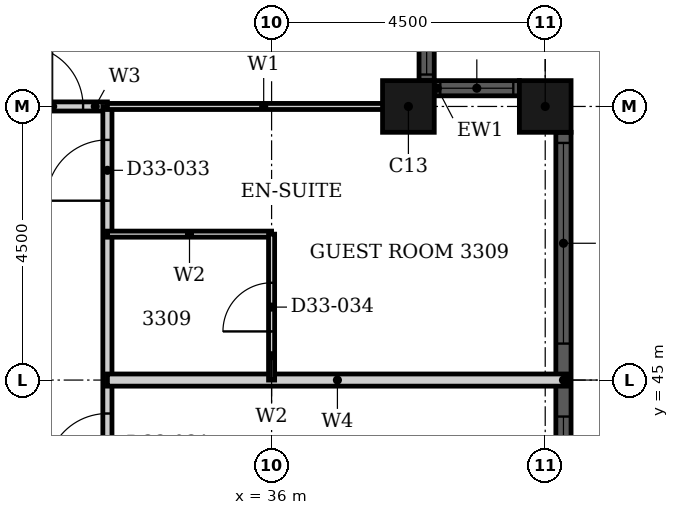
"""IFC4 building model, lengths in metres.
Left out: names, types, materials, properties, quantities, classifications, styles, units other than length and angle.
Written with IfcOpenShell. Run it as: python <this file> out.ifc"""

import sys

from ifc_helpers import new_model, si_unit, direction, frame, frame_2d, origin, origin_2d, place, context, subcontext, project, spatial, rectangle, hollow_rectangle, extrude, element, fill, save


model = new_model("IFC4")
c1 = context("Model", 3, precision=1e-05, world=origin(), true_north=direction((0.0, 1.0)))
c2 = subcontext(c1, "Body", "Model", "MODEL_VIEW")
j1 = project(units=[si_unit("LENGTHUNIT", "METRE"), si_unit("PLANEANGLEUNIT", "RADIAN")], contexts=[c1])
p1 = place(None, origin())
s1 = spatial("IfcSite", under=j1, at=p1, CompositionType="ELEMENT")
p2 = place(p1, origin())
s2 = spatial("IfcBuilding", under=s1, at=p2, CompositionType="ELEMENT")
p3 = place(p2, frame((0.0, 0.0, 133.2)))
s3 = spatial("IfcBuildingStorey", under=s2, at=p3, CompositionType="ELEMENT", Elevation=133.2)
for number, where, z_axis, x_axis in (
    (1, (40.5, 49.5, 0.0), (0.0, 0.0, 1.0), (1.0, 0.0, 0.0)),
    (2, (38.25, 49.5, 0.0), (0.0, 0.0, 1.0), (1.0, 0.0, 0.0)),
):
    element("IfcColumn", number, at=place(p3, frame(where, z_axis=z_axis, x_axis=x_axis)), inside=s3, PredefinedType="COLUMN", context=c2, shape_type="SweptSolid", body=[
        extrude(hollow_rectangle(XDim=0.85, YDim=0.85, WallThickness=0.026, at=origin_2d()), origin(), (0.0, 0.0, 1.0), 3.6),
    ])
p4 = place(p3, frame((40.8, 40.925, 0.0), z_axis=(0.0, 0.0, 1.0), x_axis=(0.0, 1.0, 0.0)))
e3 = element("IfcWall", 3, at=p4, inside=s3, PredefinedType="SOLIDWALL", context=c2, shape_type="SweptSolid", body=[
    extrude(rectangle(XDim=8.15, YDim=0.25, at=frame_2d((4.075, 0.0))), origin(), (0.0, 0.0, 1.0), 3.6),
])
p5 = place(p4, frame((0.175, 0.0, 0.9)))
e4 = element("IfcOpeningElement", 4, at=p5, cuts=e3, PredefinedType="OPENING", context=c2, shape_type="SweptSolid", body=[
    extrude(rectangle(XDim=3.3, YDim=2.08, at=frame_2d((1.65, 1.04))), frame((0.0, 0.135, 0.0), z_axis=(0.0, -1.0, 0.0), x_axis=(1.0, 0.0, 0.0)), (0.0, 0.0, 1.0), 0.27),
])
p6 = place(p4, frame((4.675, 0.0, 0.9)))
e5 = element("IfcOpeningElement", 5, at=p6, cuts=e3, PredefinedType="OPENING", context=c2, shape_type="SweptSolid", body=[
    extrude(rectangle(XDim=3.3, YDim=2.08, at=frame_2d((1.65, 1.04))), frame((0.0, 0.135, 0.0), z_axis=(0.0, -1.0, 0.0), x_axis=(1.0, 0.0, 0.0)), (0.0, 0.0, 1.0), 0.27),
])
p7 = place(p3, frame((40.075, 49.8, 0.0), z_axis=(0.0, 0.0, 1.0), x_axis=(-1.0, 0.0, 0.0)))
e6 = element("IfcWall", 6, at=p7, inside=s3, PredefinedType="SOLIDWALL", context=c2, shape_type="SweptSolid", body=[
    extrude(rectangle(XDim=1.4, YDim=0.25, at=frame_2d((0.7, 0.0))), origin(), (0.0, 0.0, 1.0), 3.6),
])
p8 = place(p7, frame((0.1, 0.0, 0.9)))
e7 = element("IfcOpeningElement", 7, at=p8, cuts=e6, PredefinedType="OPENING", context=c2, shape_type="SweptSolid", body=[
    extrude(rectangle(XDim=1.2, YDim=2.08, at=frame_2d((0.6, 1.04))), frame((0.0, 0.135, 0.0), z_axis=(0.0, -1.0, 0.0), x_axis=(1.0, 0.0, 0.0)), (0.0, 0.0, 1.0), 0.27),
])
p9 = place(p3, frame((38.55, 49.925, 0.0), z_axis=(0.0, 0.0, 1.0), x_axis=(0.0, 1.0, 0.0)))
e8 = element("IfcWall", 8, at=p9, inside=s3, PredefinedType="SOLIDWALL", context=c2, shape_type="SweptSolid", body=[
    extrude(rectangle(XDim=1.4, YDim=0.25, at=frame_2d((0.7, 0.0))), origin(), (0.0, 0.0, 1.0), 3.6),
])
p10 = place(p9, frame((0.1, 0.0, 0.9)))
e9 = element("IfcOpeningElement", 9, at=p10, cuts=e8, PredefinedType="OPENING", context=c2, shape_type="SweptSolid", body=[
    extrude(rectangle(XDim=1.2, YDim=2.08, at=frame_2d((0.6, 1.04))), frame((0.0, 0.135, 0.0), z_axis=(0.0, -1.0, 0.0), x_axis=(1.0, 0.0, 0.0)), (0.0, 0.0, 1.0), 0.27),
])
p11 = place(p3, frame((31.5, 49.5, 0.0), z_axis=(0.0, 0.0, 1.0), x_axis=(1.0, 0.0, 0.0)))
e10 = element("IfcWall", 10, at=p11, inside=s3, PredefinedType="PARTITIONING", context=c2, shape_type="SweptSolid", body=[
    extrude(rectangle(XDim=1.8, YDim=0.15, at=frame_2d((0.9, 0.0))), origin(), (0.0, 0.0, 1.0), 3.3),
])
p12 = place(p11, frame((0.4, 0.0, 0.0)))
e11 = element("IfcOpeningElement", 11, at=p12, cuts=e10, PredefinedType="OPENING", context=c2, shape_type="SweptSolid", body=[
    extrude(rectangle(XDim=1.0, YDim=2.1, at=frame_2d((0.5, 1.05))), frame((0.0, 0.085, 0.0), z_axis=(0.0, -1.0, 0.0), x_axis=(1.0, 0.0, 0.0)), (0.0, 0.0, 1.0), 0.17),
])
p13 = place(p3, frame((33.3, 33.3, 0.0), z_axis=(0.0, 0.0, 1.0), x_axis=(0.0, 1.0, 0.0)))
e12 = element("IfcWall", 12, at=p13, inside=s3, PredefinedType="PARTITIONING", context=c2, shape_type="SweptSolid", body=[
    extrude(rectangle(XDim=16.2, YDim=0.15, at=frame_2d((8.1, 0.0))), origin(), (0.0, 0.0, 1.0), 3.3),
])
p14 = place(p13, frame((10.15, 0.0, 0.0)))
e13 = element("IfcOpeningElement", 13, at=p14, cuts=e12, PredefinedType="OPENING", context=c2, shape_type="SweptSolid", body=[
    extrude(rectangle(XDim=1.0, YDim=2.1, at=frame_2d((0.5, 1.05))), frame((0.0, 0.085, 0.0), z_axis=(0.0, -1.0, 0.0), x_axis=(1.0, 0.0, 0.0)), (0.0, 0.0, 1.0), 0.17),
])
p15 = place(p13, frame((14.65, 0.0, 0.0)))
e14 = element("IfcOpeningElement", 14, at=p15, cuts=e12, PredefinedType="OPENING", context=c2, shape_type="SweptSolid", body=[
    extrude(rectangle(XDim=1.0, YDim=2.1, at=frame_2d((0.5, 1.05))), frame((0.0, 0.085, 0.0), z_axis=(0.0, -1.0, 0.0), x_axis=(1.0, 0.0, 0.0)), (0.0, 0.0, 1.0), 0.17),
])
p16 = place(p3, frame((33.3, 49.5, 0.0), z_axis=(0.0, 0.0, 1.0), x_axis=(1.0, 0.0, 0.0)))
e15 = element("IfcWall", 15, at=p16, inside=s3, PredefinedType="PARTITIONING", context=c2, shape_type="SweptSolid", body=[
    extrude(rectangle(XDim=5.14, YDim=0.1, at=frame_2d((2.57, 0.0))), origin(), (0.0, 0.0, 1.0), 3.3),
])
p17 = place(p3, frame((33.3, 45.0, 0.0), z_axis=(0.0, 0.0, 1.0), x_axis=(1.0, 0.0, 0.0)))
e16 = element("IfcWall", 16, at=p17, inside=s3, PredefinedType="PARTITIONING", context=c2, shape_type="SweptSolid", body=[
    extrude(rectangle(XDim=7.565, YDim=0.2, at=frame_2d((3.782, 0.0))), origin(), (0.0, 0.0, 1.0), 3.3),
])
p18 = place(p3, frame((33.3, 47.4, 0.0), z_axis=(0.0, 0.0, 1.0), x_axis=(1.0, 0.0, 0.0)))
e17 = element("IfcWall", 17, at=p18, inside=s3, PredefinedType="PARTITIONING", context=c2, shape_type="SweptSolid", body=[
    extrude(rectangle(XDim=2.7, YDim=0.1, at=frame_2d((1.35, 0.0))), origin(), (0.0, 0.0, 1.0), 3.3),
])
p19 = place(p3, frame((36.0, 45.0, 0.0), z_axis=(0.0, 0.0, 1.0), x_axis=(0.0, 1.0, 0.0)))
e18 = element("IfcWall", 18, at=p19, inside=s3, PredefinedType="PARTITIONING", context=c2, shape_type="SweptSolid", body=[
    extrude(rectangle(XDim=2.4, YDim=0.1, at=frame_2d((1.2, 0.0))), origin(), (0.0, 0.0, 1.0), 2.58),
])
p20 = place(p19, frame((0.8, 0.0, 0.0)))
e19 = element("IfcOpeningElement", 19, at=p20, cuts=e18, PredefinedType="OPENING", context=c2, shape_type="SweptSolid", body=[
    extrude(rectangle(XDim=0.8, YDim=2.1, at=frame_2d((0.4, 1.05))), frame((0.0, 0.06, 0.0), z_axis=(0.0, -1.0, 0.0), x_axis=(1.0, 0.0, 0.0)), (0.0, 0.0, 1.0), 0.12),
])
p21 = place(p5, origin())
e20 = element("IfcWindow", 20, at=p21, inside=s3, PartitioningType="SINGLE_PANEL", PredefinedType="WINDOW", context=c2, shape_type="SweptSolid", body=[
    extrude(rectangle(XDim=3.3, YDim=2.08, at=frame_2d((1.65, 1.04))), frame((0.0, 0.03, 0.0), z_axis=(0.0, -1.0, 0.0), x_axis=(1.0, 0.0, 0.0)), (0.0, 0.0, 1.0), 0.06),
])
fill(e4, e20)
p22 = place(p6, origin())
e21 = element("IfcWindow", 21, at=p22, inside=s3, PartitioningType="SINGLE_PANEL", PredefinedType="WINDOW", context=c2, shape_type="SweptSolid", body=[
    extrude(rectangle(XDim=3.3, YDim=2.08, at=frame_2d((1.65, 1.04))), frame((0.0, 0.03, 0.0), z_axis=(0.0, -1.0, 0.0), x_axis=(1.0, 0.0, 0.0)), (0.0, 0.0, 1.0), 0.06),
])
fill(e5, e21)
p23 = place(p8, origin())
e22 = element("IfcWindow", 22, at=p23, inside=s3, PartitioningType="SINGLE_PANEL", PredefinedType="WINDOW", context=c2, shape_type="SweptSolid", body=[
    extrude(rectangle(XDim=1.2, YDim=2.08, at=frame_2d((0.6, 1.04))), frame((0.0, 0.03, 0.0), z_axis=(0.0, -1.0, 0.0), x_axis=(1.0, 0.0, 0.0)), (0.0, 0.0, 1.0), 0.06),
])
fill(e7, e22)
p24 = place(p10, origin())
e23 = element("IfcWindow", 23, at=p24, inside=s3, PartitioningType="SINGLE_PANEL", PredefinedType="WINDOW", context=c2, shape_type="SweptSolid", body=[
    extrude(rectangle(XDim=1.2, YDim=2.08, at=frame_2d((0.6, 1.04))), frame((0.0, 0.03, 0.0), z_axis=(0.0, -1.0, 0.0), x_axis=(1.0, 0.0, 0.0)), (0.0, 0.0, 1.0), 0.06),
])
fill(e9, e23)
p25 = place(p14, origin())
e24 = element("IfcDoor", 24, at=p25, inside=s3, OperationType="SINGLE_SWING_RIGHT", PredefinedType="DOOR", context=c2, shape_type="SweptSolid", body=[
    extrude(rectangle(XDim=1.0, YDim=2.1, at=frame_2d((0.5, 1.05))), frame((0.0, 0.025, 0.0), z_axis=(0.0, -1.0, 0.0), x_axis=(1.0, 0.0, 0.0)), (0.0, 0.0, 1.0), 0.05),
])
fill(e13, e24)
p26 = place(p15, origin())
e25 = element("IfcDoor", 25, at=p26, inside=s3, OperationType="SINGLE_SWING_RIGHT", PredefinedType="DOOR", context=c2, shape_type="SweptSolid", body=[
    extrude(rectangle(XDim=1.0, YDim=2.1, at=frame_2d((0.5, 1.05))), frame((0.0, 0.025, 0.0), z_axis=(0.0, -1.0, 0.0), x_axis=(1.0, 0.0, 0.0)), (0.0, 0.0, 1.0), 0.05),
])
fill(e14, e25)
p27 = place(p20, origin())
e26 = element("IfcDoor", 26, at=p27, inside=s3, OperationType="SINGLE_SWING_RIGHT", PredefinedType="DOOR", context=c2, shape_type="SweptSolid", body=[
    extrude(rectangle(XDim=0.8, YDim=2.1, at=frame_2d((0.4, 1.05))), frame((0.0, 0.025, 0.0), z_axis=(0.0, -1.0, 0.0), x_axis=(1.0, 0.0, 0.0)), (0.0, 0.0, 1.0), 0.05),
])
fill(e19, e26)
p28 = place(p12, origin())
e27 = element("IfcDoor", 27, at=p28, inside=s3, OperationType="SINGLE_SWING_LEFT", PredefinedType="DOOR", context=c2, shape_type="SweptSolid", body=[
    extrude(rectangle(XDim=1.0, YDim=2.1, at=frame_2d((0.5, 1.05))), frame((0.0, 0.025, 0.0), z_axis=(0.0, -1.0, 0.0), x_axis=(1.0, 0.0, 0.0)), (0.0, 0.0, 1.0), 0.05),
])
fill(e11, e27)
save(model, sys.argv[1])
